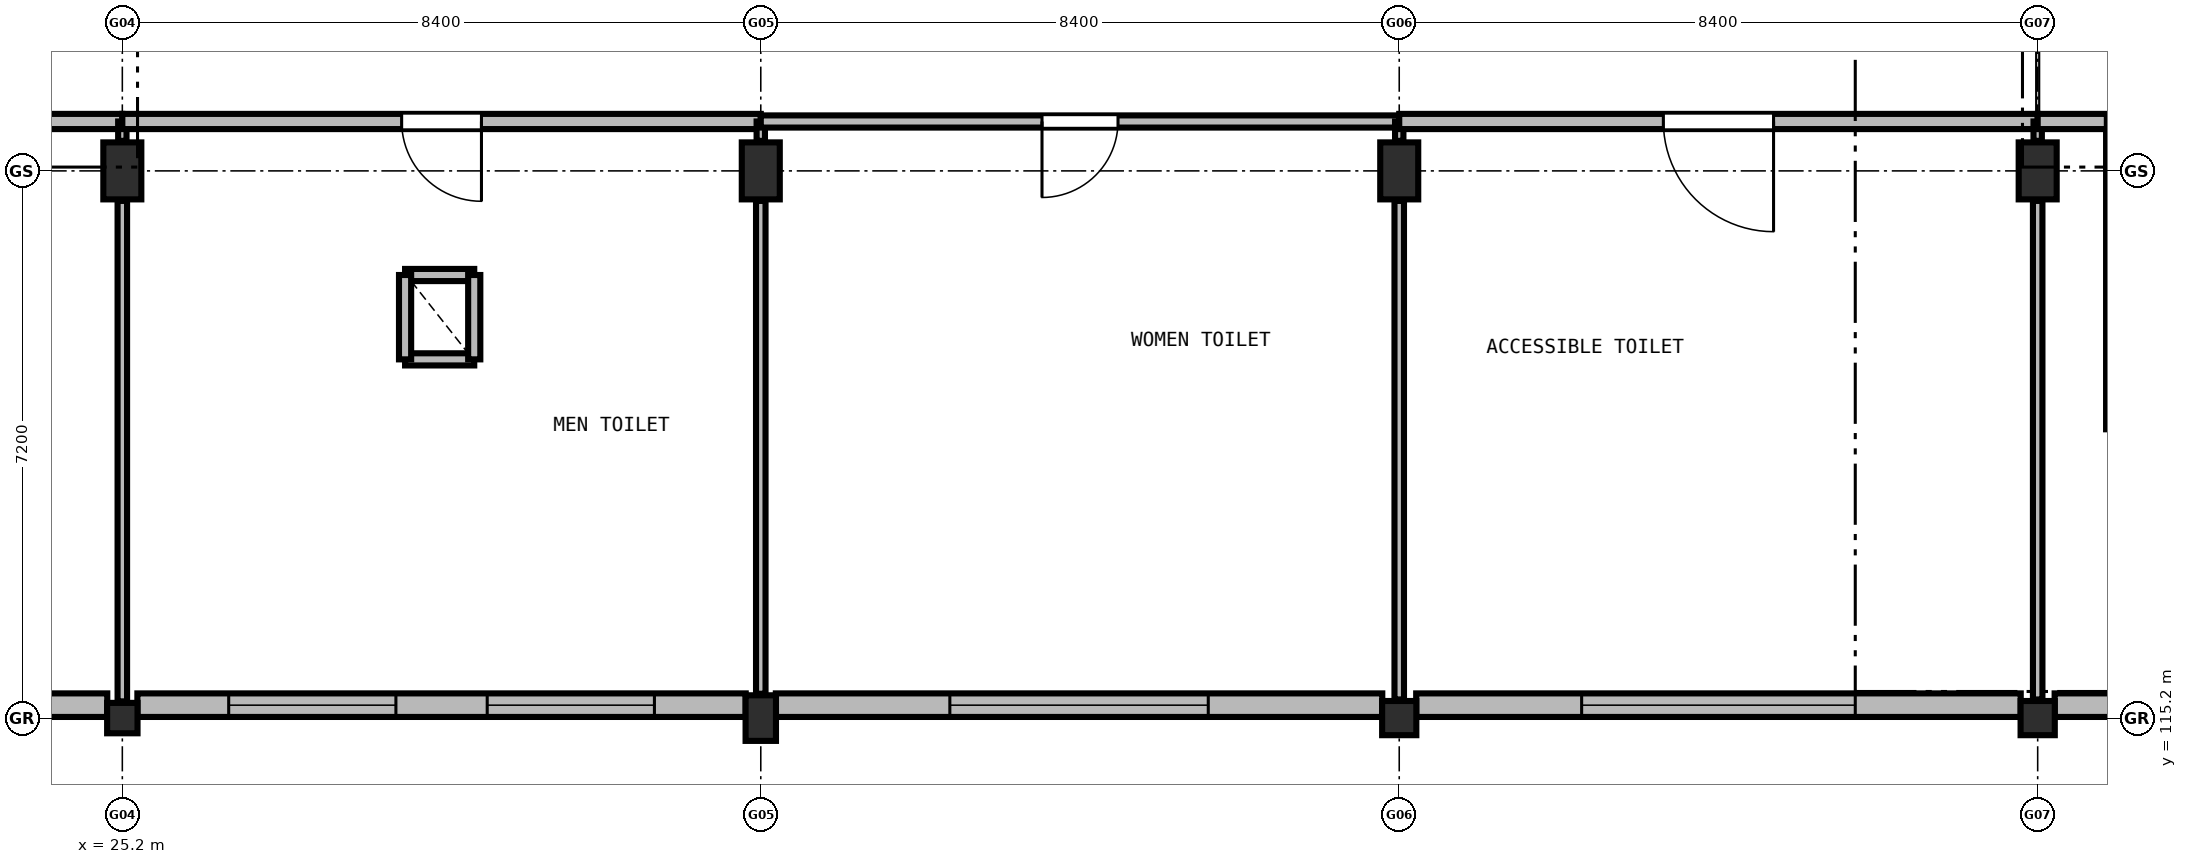
"""IFC4 building model, lengths in metres.
Left out: names, types, materials, properties, quantities, classifications, styles, units other than length and angle.
Written with IfcOpenShell. Run it as: python <this file> out.ifc"""

import sys

from ifc_helpers import new_model, si_unit, direction, frame, frame_2d, origin, origin_2d, place, context, subcontext, project, spatial, rectangle, extrude, element, fill, save


model = new_model("IFC4")
c1 = context("Model", 3, precision=1e-05, world=origin(), true_north=direction((0.0, 1.0)))
c2 = subcontext(c1, "Body", "Model", "MODEL_VIEW")
j1 = project(units=[si_unit("LENGTHUNIT", "METRE"), si_unit("PLANEANGLEUNIT", "RADIAN")], contexts=[c1])
p1 = place(None, origin())
s1 = spatial("IfcSite", under=j1, at=p1, CompositionType="ELEMENT")
p2 = place(p1, origin())
s2 = spatial("IfcBuilding", under=s1, at=p2, CompositionType="ELEMENT")
p3 = place(p2, frame((0.0, 0.0, 17.7)))
s3 = spatial("IfcBuildingStorey", under=s2, at=p3, CompositionType="ELEMENT", Elevation=17.7)
p4 = place(p3, frame((25.2, 115.2, 0.0), z_axis=(0.0, 0.0, 1.0), x_axis=(1.0, 0.0, 0.0)))
e1 = element("IfcColumn", 1, at=p4, inside=s3, PredefinedType="COLUMN", context=c2, shape_type="SweptSolid", body=[
    extrude(rectangle(XDim=0.4, YDim=0.4, at=origin_2d()), origin(), (0.0, 0.0, 1.0), 4.2),
])
p5 = place(p3, frame((25.2, 122.4, 0.0), z_axis=(0.0, 0.0, 1.0), x_axis=(1.0, 0.0, 0.0)))
e2 = element("IfcColumn", 2, at=p5, inside=s3, PredefinedType="COLUMN", context=c2, shape_type="SweptSolid", body=[
    extrude(rectangle(XDim=0.5, YDim=0.75, at=origin_2d()), origin(), (0.0, 0.0, 1.0), 4.2),
])
p6 = place(p3, frame((33.6, 115.2, 0.0), z_axis=(0.0, 0.0, 1.0), x_axis=(1.0, 0.0, 0.0)))
e3 = element("IfcColumn", 3, at=p6, inside=s3, PredefinedType="COLUMN", context=c2, shape_type="SweptSolid", body=[
    extrude(rectangle(XDim=0.4, YDim=0.6, at=origin_2d()), origin(), (0.0, 0.0, 1.0), 4.2),
])
p7 = place(p3, frame((33.6, 122.4, 0.0), z_axis=(0.0, 0.0, 1.0), x_axis=(1.0, 0.0, 0.0)))
e4 = element("IfcColumn", 4, at=p7, inside=s3, PredefinedType="COLUMN", context=c2, shape_type="SweptSolid", body=[
    extrude(rectangle(XDim=0.5, YDim=0.75, at=origin_2d()), origin(), (0.0, 0.0, 1.0), 4.2),
])
p8 = place(p3, frame((42.0, 115.2, 0.0), z_axis=(0.0, 0.0, 1.0), x_axis=(1.0, 0.0, 0.0)))
e5 = element("IfcColumn", 5, at=p8, inside=s3, PredefinedType="COLUMN", context=c2, shape_type="SweptSolid", body=[
    extrude(rectangle(XDim=0.45, YDim=0.45, at=origin_2d()), origin(), (0.0, 0.0, 1.0), 4.2),
])
p9 = place(p3, frame((42.0, 122.4, 0.0), z_axis=(0.0, 0.0, 1.0), x_axis=(1.0, 0.0, 0.0)))
e6 = element("IfcColumn", 6, at=p9, inside=s3, PredefinedType="COLUMN", context=c2, shape_type="SweptSolid", body=[
    extrude(rectangle(XDim=0.5, YDim=0.75, at=origin_2d()), origin(), (0.0, 0.0, 1.0), 4.2),
])
p10 = place(p3, frame((50.4, 115.2, 0.0), z_axis=(0.0, 0.0, 1.0), x_axis=(1.0, 0.0, 0.0)))
e7 = element("IfcColumn", 7, at=p10, inside=s3, PredefinedType="COLUMN", context=c2, shape_type="SweptSolid", body=[
    extrude(rectangle(XDim=0.45, YDim=0.45, at=origin_2d()), origin(), (0.0, 0.0, 1.0), 4.2),
])
p11 = place(p3, frame((50.4, 122.4, 0.0), z_axis=(0.0, 0.0, 1.0), x_axis=(1.0, 0.0, 0.0)))
e8 = element("IfcColumn", 8, at=p11, inside=s3, PredefinedType="COLUMN", context=c2, shape_type="SweptSolid", body=[
    extrude(rectangle(XDim=0.5, YDim=0.75, at=origin_2d()), origin(), (0.0, 0.0, 1.0), 4.2),
])
p12 = place(p3, frame((58.602, 115.37, 0.0), z_axis=(0.0, 0.0, 1.0), x_axis=(-1.0, 0.0, 0.0)))
e9 = element("IfcWall", 9, at=p12, inside=s3, PredefinedType="SOLIDWALL", context=c2, shape_type="SweptSolid", body=[
    extrude(rectangle(XDim=7.979, YDim=0.31, at=frame_2d((3.99, 0.0))), origin(), (0.0, 0.0, 1.0), 3.25),
])
p13 = place(p12, frame((1.66, 0.0, 0.95)))
e10 = element("IfcOpeningElement", 10, at=p13, cuts=e9, PredefinedType="OPENING", context=c2, shape_type="SweptSolid", body=[
    extrude(rectangle(XDim=1.5, YDim=1.4, at=frame_2d((0.75, 0.7))), frame((0.0, 0.165, 0.0), z_axis=(0.0, -1.0, 0.0), x_axis=(1.0, 0.0, 0.0)), (0.0, 0.0, 1.0), 0.33),
])
p14 = place(p12, frame((4.819, 0.0, 0.95)))
e11 = element("IfcOpeningElement", 11, at=p14, cuts=e9, PredefinedType="OPENING", context=c2, shape_type="SweptSolid", body=[
    extrude(rectangle(XDim=1.5, YDim=1.4, at=frame_2d((0.75, 0.7))), frame((0.0, 0.165, 0.0), z_axis=(0.0, -1.0, 0.0), x_axis=(1.0, 0.0, 0.0)), (0.0, 0.0, 1.0), 0.33),
])
p15 = place(p3, frame((50.177, 115.37, 0.0), z_axis=(0.0, 0.0, 1.0), x_axis=(-1.0, 0.0, 0.0)))
e12 = element("IfcWall", 12, at=p15, inside=s3, PredefinedType="SOLIDWALL", context=c2, shape_type="SweptSolid", body=[
    extrude(rectangle(XDim=7.954, YDim=0.31, at=frame_2d((3.977, 0.0))), origin(), (0.0, 0.0, 1.0), 3.25),
])
p16 = place(p15, frame((2.177, 0.0, 0.95)))
e13 = element("IfcOpeningElement", 13, at=p16, cuts=e12, PredefinedType="OPENING", context=c2, shape_type="SweptSolid", body=[
    extrude(rectangle(XDim=3.6, YDim=2.05, at=frame_2d((1.8, 1.025))), frame((0.0, 0.165, 0.0), z_axis=(0.0, -1.0, 0.0), x_axis=(1.0, 0.0, 0.0)), (0.0, 0.0, 1.0), 0.33),
])
p17 = place(p3, frame((41.777, 115.37, 0.0), z_axis=(0.0, 0.0, 1.0), x_axis=(-1.0, 0.0, 0.0)))
e14 = element("IfcWall", 14, at=p17, inside=s3, PredefinedType="SOLIDWALL", context=c2, shape_type="SweptSolid", body=[
    extrude(rectangle(XDim=7.979, YDim=0.31, at=frame_2d((3.99, 0.0))), origin(), (0.0, 0.0, 1.0), 3.25),
])
p18 = place(p17, frame((2.29, 0.0, 0.95)))
e15 = element("IfcOpeningElement", 15, at=p18, cuts=e14, PredefinedType="OPENING", context=c2, shape_type="SweptSolid", body=[
    extrude(rectangle(XDim=3.4, YDim=1.8, at=frame_2d((1.7, 0.9))), frame((0.0, 0.165, 0.0), z_axis=(0.0, -1.0, 0.0), x_axis=(1.0, 0.0, 0.0)), (0.0, 0.0, 1.0), 0.33),
])
p19 = place(p3, frame((33.402, 115.37, 0.0), z_axis=(0.0, 0.0, 1.0), x_axis=(-1.0, 0.0, 0.0)))
e16 = element("IfcWall", 16, at=p19, inside=s3, PredefinedType="SOLIDWALL", context=c2, shape_type="SweptSolid", body=[
    extrude(rectangle(XDim=8.004, YDim=0.31, at=frame_2d((4.002, 0.0))), origin(), (0.0, 0.0, 1.0), 3.25),
])
p20 = place(p19, frame((1.201, 0.0, 0.95)))
e17 = element("IfcOpeningElement", 17, at=p20, cuts=e16, PredefinedType="OPENING", context=c2, shape_type="SweptSolid", body=[
    extrude(rectangle(XDim=2.2, YDim=1.7, at=frame_2d((1.1, 0.85))), frame((0.0, 0.165, 0.0), z_axis=(0.0, -1.0, 0.0), x_axis=(1.0, 0.0, 0.0)), (0.0, 0.0, 1.0), 0.33),
])
p21 = place(p19, frame((4.603, 0.0, 0.95)))
e18 = element("IfcOpeningElement", 18, at=p21, cuts=e16, PredefinedType="OPENING", context=c2, shape_type="SweptSolid", body=[
    extrude(rectangle(XDim=2.2, YDim=1.7, at=frame_2d((1.1, 0.85))), frame((0.0, 0.165, 0.0), z_axis=(0.0, -1.0, 0.0), x_axis=(1.0, 0.0, 0.0)), (0.0, 0.0, 1.0), 0.33),
])
p22 = place(p3, frame((25.002, 115.37, 0.0), z_axis=(0.0, 0.0, 1.0), x_axis=(-1.0, 0.0, 0.0)))
e19 = element("IfcWall", 19, at=p22, inside=s3, PredefinedType="SOLIDWALL", context=c2, shape_type="SweptSolid", body=[
    extrude(rectangle(XDim=8.004, YDim=0.31, at=frame_2d((4.002, 0.0))), origin(), (0.0, 0.0, 1.0), 3.25),
])
p23 = place(p22, frame((1.001, 0.0, 0.95)))
e20 = element("IfcOpeningElement", 20, at=p23, cuts=e19, PredefinedType="OPENING", context=c2, shape_type="SweptSolid", body=[
    extrude(rectangle(XDim=2.5, YDim=2.05, at=frame_2d((1.25, 1.025))), frame((0.0, 0.165, 0.0), z_axis=(0.0, -1.0, 0.0), x_axis=(1.0, 0.0, 0.0)), (0.0, 0.0, 1.0), 0.33),
])
p24 = place(p22, frame((4.503, 0.0, 0.95)))
e21 = element("IfcOpeningElement", 21, at=p24, cuts=e19, PredefinedType="OPENING", context=c2, shape_type="SweptSolid", body=[
    extrude(rectangle(XDim=2.5, YDim=2.05, at=frame_2d((1.25, 1.025))), frame((0.0, 0.165, 0.0), z_axis=(0.0, -1.0, 0.0), x_axis=(1.0, 0.0, 0.0)), (0.0, 0.0, 1.0), 0.33),
])
p25 = place(p3, frame((51.45, 119.0, 0.0), z_axis=(0.0, 0.0, 1.0), x_axis=(0.0, 1.0, 0.0)))
e22 = element("IfcWall", 22, at=p25, inside=s3, PredefinedType="SHEAR", context=c2, shape_type="SweptSolid", body=[
    extrude(rectangle(XDim=4.1, YDim=0.3, at=frame_2d((2.05, 0.0))), origin(), (0.0, 0.0, 1.0), 3.88),
])
for number, where, z_axis, x_axis in (
    (23, (28.92, 119.92, 0.0), (0.0, 0.0, 1.0), (1.0, 0.0, 0.0)),
    (24, (29.83, 121.03, 0.0), (0.0, 0.0, 1.0), (-1.0, 0.0, 0.0)),
):
    element("IfcWall", number, at=place(p3, frame(where, z_axis=z_axis, x_axis=x_axis)), inside=s3, PredefinedType="PARTITIONING", context=c2, shape_type="SweptSolid", body=[
        extrude(rectangle(XDim=0.91, YDim=0.16, at=frame_2d((0.455, 0.0))), origin(), (0.0, 0.0, 1.0), 3.65),
    ])
for number, where, z_axis, x_axis in (
    (25, (28.92, 121.03, 0.0), (0.0, 0.0, 1.0), (0.0, -1.0, 0.0)),
    (26, (29.83, 119.92, 0.0), (0.0, 0.0, 1.0), (0.0, 1.0, 0.0)),
):
    element("IfcWall", number, at=place(p3, frame(where, z_axis=z_axis, x_axis=x_axis)), inside=s3, PredefinedType="PARTITIONING", context=c2, shape_type="SweptSolid", body=[
        extrude(rectangle(XDim=1.11, YDim=0.16, at=frame_2d((0.555, 0.0))), origin(), (0.0, 0.0, 1.0), 3.65),
    ])
p26 = place(p3, frame((25.2, 123.05, 0.0), z_axis=(0.0, 0.0, 1.0), x_axis=(-1.0, 0.0, 0.0)))
e27 = element("IfcWall", 27, at=p26, inside=s3, PredefinedType="SOLIDWALL", context=c2, shape_type="SweptSolid", body=[
    extrude(rectangle(XDim=6.11, YDim=0.2, at=frame_2d((3.055, 0.0))), origin(), (0.0, 0.0, 1.0), 3.355),
])
p27 = place(p3, frame((25.2, 115.42, 0.0), z_axis=(0.0, 0.0, 1.0), x_axis=(0.0, 1.0, 0.0)))
e28 = element("IfcWall", 28, at=p27, inside=s3, PredefinedType="PARTITIONING", context=c2, shape_type="SweptSolid", body=[
    extrude(rectangle(XDim=6.585, YDim=0.125, at=frame_2d((3.292, 0.0))), origin(), (0.0, 0.0, 1.0), 3.225),
])
p28 = place(p3, frame((25.2, 122.795, 0.0), z_axis=(0.0, 0.0, 1.0), x_axis=(0.0, 1.0, 0.0)))
e29 = element("IfcWall", 29, at=p28, inside=s3, PredefinedType="PARTITIONING", context=c2, shape_type="SweptSolid", body=[
    extrude(rectangle(XDim=0.255, YDim=0.11, at=frame_2d((0.127, 0.0))), origin(), (0.0, 0.0, 1.0), 3.225),
])
p29 = place(p3, frame((33.6, 123.05, 0.0), z_axis=(0.0, 0.0, 1.0), x_axis=(-1.0, 0.0, 0.0)))
e30 = element("IfcWall", 30, at=p29, inside=s3, PredefinedType="SOLIDWALL", context=c2, shape_type="SweptSolid", body=[
    extrude(rectangle(XDim=8.4, YDim=0.2, at=frame_2d((4.2, 0.0))), origin(), (0.0, 0.0, 1.0), 3.355),
])
p30 = place(p29, frame((3.675, 0.0, 0.0)))
e31 = element("IfcOpeningElement", 31, at=p30, cuts=e30, PredefinedType="OPENING", context=c2, shape_type="SweptSolid", body=[
    extrude(rectangle(XDim=1.05, YDim=2.15, at=frame_2d((0.525, 1.075))), frame((0.0, 0.11, 0.0), z_axis=(0.0, -1.0, 0.0), x_axis=(1.0, 0.0, 0.0)), (0.0, 0.0, 1.0), 0.22),
])
p31 = place(p3, frame((33.6, 115.52, 0.0), z_axis=(0.0, 0.0, 1.0), x_axis=(0.0, 1.0, 0.0)))
e32 = element("IfcWall", 32, at=p31, inside=s3, PredefinedType="PARTITIONING", context=c2, shape_type="SweptSolid", body=[
    extrude(rectangle(XDim=6.485, YDim=0.125, at=frame_2d((3.242, 0.0))), origin(), (0.0, 0.0, 1.0), 3.225),
])
p32 = place(p3, frame((33.6, 122.795, 0.0), z_axis=(0.0, 0.0, 1.0), x_axis=(0.0, 1.0, 0.0)))
e33 = element("IfcWall", 33, at=p32, inside=s3, PredefinedType="PARTITIONING", context=c2, shape_type="SweptSolid", body=[
    extrude(rectangle(XDim=0.255, YDim=0.11, at=frame_2d((0.127, 0.0))), origin(), (0.0, 0.0, 1.0), 3.225),
])
p33 = place(p3, frame((42.0, 123.05, 0.0), z_axis=(0.0, 0.0, 1.0), x_axis=(-1.0, 0.0, 0.0)))
e34 = element("IfcWall", 34, at=p33, inside=s3, PredefinedType="PARTITIONING", context=c2, shape_type="SweptSolid", body=[
    extrude(rectangle(XDim=8.4, YDim=0.16, at=frame_2d((4.2, 0.0))), origin(), (0.0, 0.0, 1.0), 3.355),
])
p34 = place(p33, frame((3.7, 0.0, 0.0)))
e35 = element("IfcOpeningElement", 35, at=p34, cuts=e34, PredefinedType="OPENING", context=c2, shape_type="SweptSolid", body=[
    extrude(rectangle(XDim=1.0, YDim=2.1, at=frame_2d((0.5, 1.05))), frame((0.0, 0.09, 0.0), z_axis=(0.0, -1.0, 0.0), x_axis=(1.0, 0.0, 0.0)), (0.0, 0.0, 1.0), 0.18),
])
p35 = place(p3, frame((42.0, 115.445, 0.0), z_axis=(0.0, 0.0, 1.0), x_axis=(0.0, 1.0, 0.0)))
e36 = element("IfcWall", 36, at=p35, inside=s3, PredefinedType="PARTITIONING", context=c2, shape_type="SweptSolid", body=[
    extrude(rectangle(XDim=6.56, YDim=0.125, at=frame_2d((3.28, 0.0))), origin(), (0.0, 0.0, 1.0), 3.225),
])
p36 = place(p3, frame((42.0, 122.795, 0.0), z_axis=(0.0, 0.0, 1.0), x_axis=(0.0, 1.0, 0.0)))
e37 = element("IfcWall", 37, at=p36, inside=s3, PredefinedType="PARTITIONING", context=c2, shape_type="SweptSolid", body=[
    extrude(rectangle(XDim=0.255, YDim=0.11, at=frame_2d((0.127, 0.0))), origin(), (0.0, 0.0, 1.0), 3.225),
])
p37 = place(p3, frame((50.4, 123.05, 0.0), z_axis=(0.0, 0.0, 1.0), x_axis=(-1.0, 0.0, 0.0)))
e38 = element("IfcWall", 38, at=p37, inside=s3, PredefinedType="SOLIDWALL", context=c2, shape_type="SweptSolid", body=[
    extrude(rectangle(XDim=8.4, YDim=0.2, at=frame_2d((4.2, 0.0))), origin(), (0.0, 0.0, 1.0), 3.355),
])
p38 = place(p37, frame((3.475, 0.0, 0.0)))
e39 = element("IfcOpeningElement", 39, at=p38, cuts=e38, PredefinedType="OPENING", context=c2, shape_type="SweptSolid", body=[
    extrude(rectangle(XDim=1.45, YDim=2.2, at=frame_2d((0.725, 1.1))), frame((0.0, 0.11, 0.0), z_axis=(0.0, -1.0, 0.0), x_axis=(1.0, 0.0, 0.0)), (0.0, 0.0, 1.0), 0.22),
])
p39 = place(p3, frame((50.4, 115.445, 0.0), z_axis=(0.0, 0.0, 1.0), x_axis=(0.0, 1.0, 0.0)))
e40 = element("IfcWall", 40, at=p39, inside=s3, PredefinedType="PARTITIONING", context=c2, shape_type="SweptSolid", body=[
    extrude(rectangle(XDim=6.56, YDim=0.125, at=frame_2d((3.28, 0.0))), origin(), (0.0, 0.0, 1.0), 3.225),
])
p40 = place(p3, frame((50.4, 122.795, 0.0), z_axis=(0.0, 0.0, 1.0), x_axis=(0.0, 1.0, 0.0)))
e41 = element("IfcWall", 41, at=p40, inside=s3, PredefinedType="PARTITIONING", context=c2, shape_type="SweptSolid", body=[
    extrude(rectangle(XDim=0.255, YDim=0.11, at=frame_2d((0.127, 0.0))), origin(), (0.0, 0.0, 1.0), 3.225),
])
p41 = place(p3, frame((51.31, 123.05, 0.0), z_axis=(0.0, 0.0, 1.0), x_axis=(-1.0, 0.0, 0.0)))
e42 = element("IfcWall", 42, at=p41, inside=s3, PredefinedType="SOLIDWALL", context=c2, shape_type="SweptSolid", body=[
    extrude(rectangle(XDim=0.91, YDim=0.2, at=frame_2d((0.455, 0.0))), origin(), (0.0, 0.0, 1.0), 3.355),
])
p42 = place(p16, origin())
e43 = element("IfcWindow", 43, at=p42, inside=s3, PartitioningType="SINGLE_PANEL", PredefinedType="WINDOW", context=c2, shape_type="SweptSolid", body=[
    extrude(rectangle(XDim=3.6, YDim=2.05, at=frame_2d((1.8, 1.025))), frame((0.0, 0.03, 0.0), z_axis=(0.0, -1.0, 0.0), x_axis=(1.0, 0.0, 0.0)), (0.0, 0.0, 1.0), 0.06),
])
fill(e13, e43)
p43 = place(p18, origin())
e44 = element("IfcWindow", 44, at=p43, inside=s3, PartitioningType="SINGLE_PANEL", PredefinedType="WINDOW", context=c2, shape_type="SweptSolid", body=[
    extrude(rectangle(XDim=3.4, YDim=1.8, at=frame_2d((1.7, 0.9))), frame((0.0, 0.03, 0.0), z_axis=(0.0, -1.0, 0.0), x_axis=(1.0, 0.0, 0.0)), (0.0, 0.0, 1.0), 0.06),
])
fill(e15, e44)
p44 = place(p20, origin())
e45 = element("IfcWindow", 45, at=p44, inside=s3, PartitioningType="SINGLE_PANEL", PredefinedType="WINDOW", context=c2, shape_type="SweptSolid", body=[
    extrude(rectangle(XDim=2.2, YDim=1.7, at=frame_2d((1.1, 0.85))), frame((0.0, 0.03, 0.0), z_axis=(0.0, -1.0, 0.0), x_axis=(1.0, 0.0, 0.0)), (0.0, 0.0, 1.0), 0.06),
])
fill(e17, e45)
p45 = place(p21, origin())
e46 = element("IfcWindow", 46, at=p45, inside=s3, PartitioningType="SINGLE_PANEL", PredefinedType="WINDOW", context=c2, shape_type="SweptSolid", body=[
    extrude(rectangle(XDim=2.2, YDim=1.7, at=frame_2d((1.1, 0.85))), frame((0.0, 0.03, 0.0), z_axis=(0.0, -1.0, 0.0), x_axis=(1.0, 0.0, 0.0)), (0.0, 0.0, 1.0), 0.06),
])
fill(e18, e46)
p46 = place(p30, origin())
e47 = element("IfcDoor", 47, at=p46, inside=s3, OperationType="SINGLE_SWING_LEFT", PredefinedType="DOOR", context=c2, shape_type="SweptSolid", body=[
    extrude(rectangle(XDim=1.05, YDim=2.15, at=frame_2d((0.525, 1.075))), frame((0.0, 0.025, 0.0), z_axis=(0.0, -1.0, 0.0), x_axis=(1.0, 0.0, 0.0)), (0.0, 0.0, 1.0), 0.05),
])
fill(e31, e47)
p47 = place(p34, origin())
e48 = element("IfcDoor", 48, at=p47, inside=s3, OperationType="SINGLE_SWING_RIGHT", PredefinedType="DOOR", context=c2, shape_type="SweptSolid", body=[
    extrude(rectangle(XDim=1.0, YDim=2.1, at=frame_2d((0.5, 1.05))), frame((0.0, 0.025, 0.0), z_axis=(0.0, -1.0, 0.0), x_axis=(1.0, 0.0, 0.0)), (0.0, 0.0, 1.0), 0.05),
])
fill(e35, e48)
p48 = place(p38, origin())
e49 = element("IfcDoor", 49, at=p48, inside=s3, OperationType="SINGLE_SWING_LEFT", PredefinedType="DOOR", context=c2, shape_type="SweptSolid", body=[
    extrude(rectangle(XDim=1.45, YDim=2.2, at=frame_2d((0.725, 1.1))), frame((0.0, 0.025, 0.0), z_axis=(0.0, -1.0, 0.0), x_axis=(1.0, 0.0, 0.0)), (0.0, 0.0, 1.0), 0.05),
])
fill(e39, e49)
save(model, sys.argv[1])
